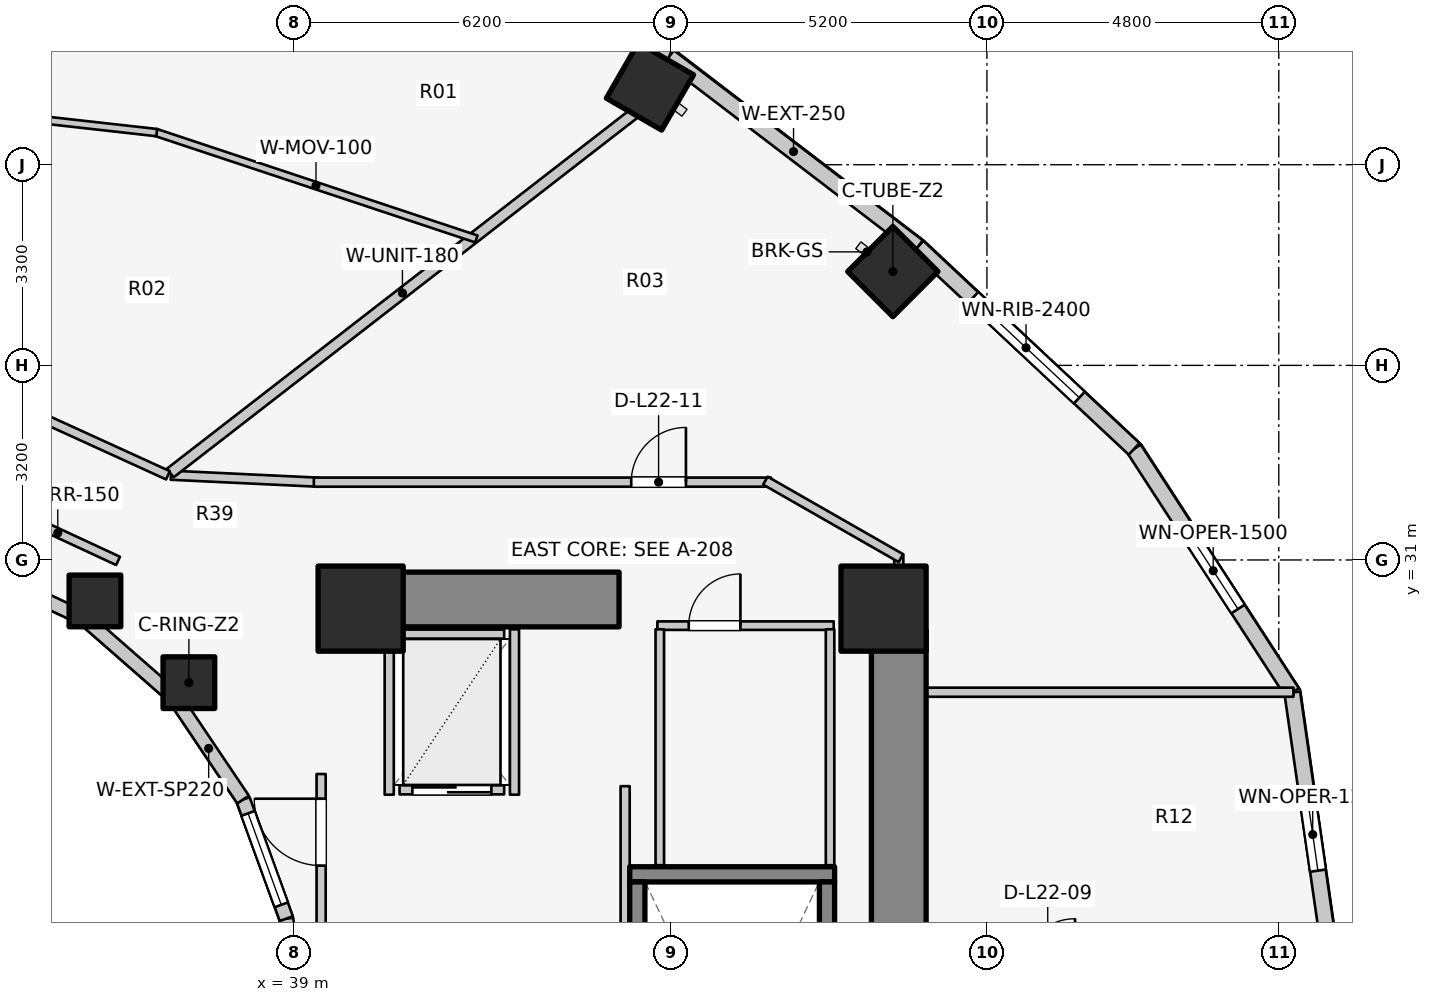
"""IFC4 building model, lengths in metres.
Left out: names, types, materials, properties, quantities, classifications, styles, units other than length and angle.
Written with IfcOpenShell. Run it as: python <this file> out.ifc"""

import sys

from ifc_helpers import new_model, si_unit, direction, frame, frame_2d, origin, origin_2d, place, context, subcontext, project, spatial, rectangle, extrude, element, fill, save


model = new_model("IFC4")
c1 = context("Model", 3, precision=1e-05, world=origin(), true_north=direction((0.0, 1.0)))
c2 = subcontext(c1, "Body", "Model", "MODEL_VIEW")
j1 = project(units=[si_unit("LENGTHUNIT", "METRE"), si_unit("PLANEANGLEUNIT", "RADIAN")], contexts=[c1])
p1 = place(None, origin())
s1 = spatial("IfcSite", under=j1, at=p1, CompositionType="ELEMENT")
p2 = place(p1, origin())
s2 = spatial("IfcBuilding", under=s1, at=p2, CompositionType="ELEMENT")
p3 = place(p2, frame((0.0, 0.0, 76.3)))
s3 = spatial("IfcBuildingStorey", under=s2, at=p3, CompositionType="ELEMENT", Elevation=76.3)
p4 = place(p3, frame((48.95, 17.05, 0.0), z_axis=(0.0, 0.0, 1.0), x_axis=(0.0, 1.0, 0.0)))
e1 = element("IfcWall", 1, at=p4, inside=s3, PredefinedType="SHEAR", context=c2, shape_type="SweptSolid", body=[
    extrude(rectangle(XDim=12.8, YDim=0.9, at=frame_2d((6.4, 0.0))), origin(), (0.0, 0.0, 1.0), 3.1),
])
p5 = place(p3, frame((39.85, 30.35, 0.0), z_axis=(0.0, 0.0, 1.0), x_axis=(1.0, 0.0, 0.0)))
e2 = element("IfcWall", 2, at=p5, inside=s3, PredefinedType="SHEAR", context=c2, shape_type="SweptSolid", body=[
    extrude(rectangle(XDim=4.5, YDim=0.9, at=frame_2d((2.25, 0.0))), origin(), (0.0, 0.0, 1.0), 3.1),
])
p6 = place(p3, frame((44.525, 25.83, 0.0), z_axis=(0.0, 0.0, 1.0), x_axis=(1.0, 0.0, 0.0)))
e3 = element("IfcWall", 3, at=p6, inside=s3, PredefinedType="SOLIDWALL", context=c2, shape_type="SweptSolid", body=[
    extrude(rectangle(XDim=3.37, YDim=0.25, at=frame_2d((1.685, 0.0))), origin(), (0.0, 0.0, 1.0), 3.1),
])
for number, where, z_axis, x_axis in (
    (4, (44.65, 17.895, 0.0), (0.0, 0.0, 1.0), (0.0, 1.0, 0.0)),
    (5, (47.77, 17.895, 0.0), (0.0, 0.0, 1.0), (0.0, 1.0, 0.0)),
):
    element("IfcWall", number, at=place(p3, frame(where, z_axis=z_axis, x_axis=x_axis)), inside=s3, PredefinedType="SOLIDWALL", context=c2, shape_type="SweptSolid", body=[
        extrude(rectangle(XDim=7.81, YDim=0.25, at=frame_2d((3.905, 0.0))), origin(), (0.0, 0.0, 1.0), 3.1),
    ])
for number, where, z_axis, x_axis in (
    (6, (48.7, 30.2, 0.0), (0.0, 0.0, 1.0), (1.0, 0.0, 0.0)),
    (7, (40.1, 30.2, 0.0), (0.0, 0.0, 1.0), (1.0, 0.0, 0.0)),
):
    element("IfcColumn", number, at=place(p3, frame(where, z_axis=z_axis, x_axis=x_axis)), inside=s3, PredefinedType="COLUMN", context=c2, shape_type="SweptSolid", body=[
        extrude(rectangle(XDim=1.4, YDim=1.4, at=origin_2d()), origin(), (0.0, 0.0, 1.0), 3.1),
    ])
p7 = place(p3, frame((37.275, 28.982, 0.0), z_axis=(0.0, 0.0, 1.0), x_axis=(1.0, 0.0, 0.0)))
e8 = element("IfcColumn", 8, at=p7, inside=s3, PredefinedType="COLUMN", context=c2, shape_type="SweptSolid", body=[
    extrude(rectangle(XDim=0.85, YDim=0.85, at=origin_2d()), origin(), (0.0, 0.0, 1.0), 3.1),
])
p8 = place(p3, frame((48.853, 35.743, 0.0), z_axis=(0.0, 0.0, 1.0), x_axis=(0.707106781187, 0.707106781187, 0.0)))
e9 = element("IfcColumn", 9, at=p8, inside=s3, PredefinedType="COLUMN", context=c2, shape_type="SweptSolid", body=[
    extrude(rectangle(XDim=1.05, YDim=1.05, at=origin_2d()), origin(), (0.0, 0.0, 1.0), 3.1),
])
p9 = place(p3, frame((35.73, 30.327, 0.0), z_axis=(0.0, 0.0, 1.0), x_axis=(1.0, 0.0, 0.0)))
e10 = element("IfcColumn", 10, at=p9, inside=s3, PredefinedType="COLUMN", context=c2, shape_type="SweptSolid", body=[
    extrude(rectangle(XDim=0.85, YDim=0.85, at=origin_2d()), origin(), (0.0, 0.0, 1.0), 3.1),
])
p10 = place(p3, frame((44.858, 38.786, 0.0), z_axis=(0.0, 0.0, 1.0), x_axis=(0.5, 0.866025403784, 0.0)))
e11 = element("IfcColumn", 11, at=p10, inside=s3, PredefinedType="COLUMN", context=c2, shape_type="SweptSolid", body=[
    extrude(rectangle(XDim=1.05, YDim=1.05, at=origin_2d()), origin(), (0.0, 0.0, 1.0), 3.1),
])
p11 = place(p3, frame((39.12, 23.0, 0.0), z_axis=(0.0, 0.0, 1.0), x_axis=(-0.114711713601, 0.993398823617, 0.0)))
e12 = element("IfcWall", 12, at=p11, inside=s3, PredefinedType="STANDARD", context=c2, shape_type="SweptSolid", body=[
    extrude(rectangle(XDim=2.115, YDim=0.23, at=frame_2d((1.058, 0.0))), origin(), (0.0, 0.0, 1.0), 2.84),
])
p12 = place(p3, frame((38.877, 25.102, 0.0), z_axis=(0.0, 0.0, 1.0), x_axis=(-0.341423187295, 0.93990968033, 0.0)))
e13 = element("IfcWall", 13, at=p12, inside=s3, PredefinedType="STANDARD", context=c2, shape_type="SweptSolid", body=[
    extrude(rectangle(XDim=2.084, YDim=0.23, at=frame_2d((1.042, 0.0))), origin(), (0.0, 0.0, 1.0), 2.84),
])
p13 = place(p12, frame((0.242, 0.0, 0.85)))
e14 = element("IfcOpeningElement", 14, at=p13, cuts=e13, PredefinedType="OPENING", context=c2, shape_type="SweptSolid", body=[
    extrude(rectangle(XDim=1.6, YDim=1.65, at=frame_2d((0.8, 0.825))), frame((0.0, 0.125, 0.0), z_axis=(0.0, -1.0, 0.0), x_axis=(1.0, 0.0, 0.0)), (0.0, 0.0, 1.0), 0.25),
])
p14 = place(p3, frame((38.166, 27.06, 0.0), z_axis=(0.0, 0.0, 1.0), x_axis=(-0.558197800898, 0.829707909492, 0.0)))
e15 = element("IfcWall", 15, at=p14, inside=s3, PredefinedType="STANDARD", context=c2, shape_type="SweptSolid", body=[
    extrude(rectangle(XDim=2.027, YDim=0.23, at=frame_2d((1.013, 0.0))), origin(), (0.0, 0.0, 1.0), 2.16),
])
p15 = place(p3, frame((37.035, 28.742, 0.0), z_axis=(0.0, 0.0, 1.0), x_axis=(-0.752576694707, 0.658504607869, 0.0)))
e16 = element("IfcWall", 16, at=p15, inside=s3, PredefinedType="STANDARD", context=c2, shape_type="SweptSolid", body=[
    extrude(rectangle(XDim=1.959, YDim=0.23, at=frame_2d((0.98, 0.0))), origin(), (0.0, 0.0, 1.0), 2.16),
])
p16 = place(p3, frame((35.56, 30.032, 0.0), z_axis=(0.0, 0.0, 1.0), x_axis=(-0.904179699603, 0.427152280606, 0.0)))
e17 = element("IfcWall", 17, at=p16, inside=s3, PredefinedType="STANDARD", context=c2, shape_type="SweptSolid", body=[
    extrude(rectangle(XDim=1.899, YDim=0.23, at=frame_2d((0.95, 0.0))), origin(), (0.0, 0.0, 1.0), 2.16),
])
p17 = place(p3, frame((56.26, 23.0, 0.0), z_axis=(0.0, 0.0, 1.0), x_axis=(-0.142572472068, 0.98978436551, 0.0)))
e18 = element("IfcWall", 18, at=p17, inside=s3, PredefinedType="STANDARD", context=c2, shape_type="SweptSolid", body=[
    extrude(rectangle(XDim=5.879, YDim=0.26, at=frame_2d((2.939, 0.0))), origin(), (0.0, 0.0, 1.0), 2.85),
])
p18 = place(p17, frame((2.921, 0.0, 0.75)))
e19 = element("IfcOpeningElement", 19, at=p18, cuts=e18, PredefinedType="OPENING", context=c2, shape_type="SweptSolid", body=[
    extrude(rectangle(XDim=1.2, YDim=1.5, at=frame_2d((0.6, 0.75))), frame((0.0, 0.14, 0.0), z_axis=(0.0, -1.0, 0.0), x_axis=(1.0, 0.0, 0.0)), (0.0, 0.0, 1.0), 0.28),
])
p19 = place(p3, frame((55.422, 28.819, 0.0), z_axis=(0.0, 0.0, 1.0), x_axis=(-0.544388392991, 0.838833283541, 0.0)))
e20 = element("IfcWall", 20, at=p19, inside=s3, PredefinedType="STANDARD", context=c2, shape_type="SweptSolid", body=[
    extrude(rectangle(XDim=4.778, YDim=0.26, at=frame_2d((2.389, 0.0))), origin(), (0.0, 0.0, 1.0), 2.85),
])
p20 = place(p19, frame((1.639, 0.0, 0.75)))
e21 = element("IfcOpeningElement", 21, at=p20, cuts=e20, PredefinedType="OPENING", context=c2, shape_type="SweptSolid", body=[
    extrude(rectangle(XDim=1.5, YDim=1.6, at=frame_2d((0.75, 0.8))), frame((0.0, 0.14, 0.0), z_axis=(0.0, -1.0, 0.0), x_axis=(1.0, 0.0, 0.0)), (0.0, 0.0, 1.0), 0.28),
])
p21 = place(p3, frame((52.821, 32.827, 0.0), z_axis=(0.0, 0.0, 1.0), x_axis=(-0.730162452258, 0.68327358599, 0.0)))
e22 = element("IfcWall", 22, at=p21, inside=s3, PredefinedType="STANDARD", context=c2, shape_type="SweptSolid", body=[
    extrude(rectangle(XDim=4.868, YDim=0.26, at=frame_2d((2.434, 0.0))), origin(), (0.0, 0.0, 1.0), 2.85),
])
p22 = place(p21, frame((1.234, 0.0, 0.75)))
e23 = element("IfcOpeningElement", 23, at=p22, cuts=e22, PredefinedType="OPENING", context=c2, shape_type="SweptSolid", body=[
    extrude(rectangle(XDim=2.4, YDim=1.7, at=frame_2d((1.2, 0.85))), frame((0.0, 0.14, 0.0), z_axis=(0.0, -1.0, 0.0), x_axis=(1.0, 0.0, 0.0)), (0.0, 0.0, 1.0), 0.28),
])
p23 = place(p3, frame((49.266, 36.153, 0.0), z_axis=(0.0, 0.0, 1.0), x_axis=(-0.794809810864, 0.606858603427, 0.0)))
e24 = element("IfcWall", 24, at=p23, inside=s3, PredefinedType="STANDARD", context=c2, shape_type="SweptSolid", body=[
    extrude(rectangle(XDim=5.149, YDim=0.26, at=frame_2d((2.575, 0.0))), origin(), (0.0, 0.0, 1.0), 2.85),
])
p24 = place(p3, frame((45.173, 39.278, 0.0), z_axis=(0.0, 0.0, 1.0), x_axis=(-0.914336605747, 0.404955023911, 0.0)))
e25 = element("IfcWall", 25, at=p24, inside=s3, PredefinedType="STANDARD", context=c2, shape_type="SweptSolid", body=[
    extrude(rectangle(XDim=5.859, YDim=0.26, at=frame_2d((2.929, 0.0))), origin(), (0.0, 0.0, 1.0), 2.85),
])
p25 = place(p24, frame((2.179, 0.0, 0.75)))
e26 = element("IfcOpeningElement", 26, at=p25, cuts=e25, PredefinedType="OPENING", context=c2, shape_type="SweptSolid", body=[
    extrude(rectangle(XDim=1.5, YDim=1.6, at=frame_2d((0.75, 0.8))), frame((0.0, 0.14, 0.0), z_axis=(0.0, -1.0, 0.0), x_axis=(1.0, 0.0, 0.0)), (0.0, 0.0, 1.0), 0.28),
])
p26 = place(p3, frame((40.74, 27.22, 0.0), z_axis=(0.0, 0.0, 1.0), x_axis=(1.0, 0.0, 0.0)))
e27 = element("IfcWall", 27, at=p26, inside=s3, PredefinedType="SOLIDWALL", context=c2, shape_type="SweptSolid", body=[
    extrude(rectangle(XDim=1.72, YDim=0.15, at=frame_2d((0.86, 0.0))), origin(), (0.0, 0.0, 1.0), 2.855),
])
p27 = place(p26, frame((0.21, 0.0, 0.0)))
e28 = element("IfcOpeningElement", 28, at=p27, cuts=e27, PredefinedType="OPENING", context=c2, shape_type="SweptSolid", body=[
    extrude(rectangle(XDim=1.3, YDim=2.1, at=frame_2d((0.65, 1.05))), frame((0.0, 0.085, 0.0), z_axis=(0.0, -1.0, 0.0), x_axis=(1.0, 0.0, 0.0)), (0.0, 0.0, 1.0), 0.17),
])
p28 = place(p3, frame((40.74, 29.78, 0.0), z_axis=(0.0, 0.0, 1.0), x_axis=(1.0, 0.0, 0.0)))
e29 = element("IfcWall", 29, at=p28, inside=s3, PredefinedType="SOLIDWALL", context=c2, shape_type="SweptSolid", body=[
    extrude(rectangle(XDim=1.72, YDim=0.15, at=frame_2d((0.86, 0.0))), origin(), (0.0, 0.0, 1.0), 2.855),
])
for number, where, z_axis, x_axis in (
    (30, (40.57, 27.14, 0.0), (0.0, 0.0, 1.0), (0.0, 1.0, 0.0)),
    (31, (42.63, 27.14, 0.0), (0.0, 0.0, 1.0), (0.0, 1.0, 0.0)),
):
    element("IfcWall", number, at=place(p3, frame(where, z_axis=z_axis, x_axis=x_axis)), inside=s3, PredefinedType="SOLIDWALL", context=c2, shape_type="SweptSolid", body=[
        extrude(rectangle(XDim=2.72, YDim=0.15, at=frame_2d((1.36, 0.0))), origin(), (0.0, 0.0, 1.0), 2.855),
    ])
p29 = place(p3, frame((44.45, 24.08, 0.0), z_axis=(0.0, 0.0, 1.0), x_axis=(0.0, 1.0, 0.0)))
e32 = element("IfcWall", 32, at=p29, inside=s3, PredefinedType="PARTITIONING", context=c2, shape_type="SweptSolid", body=[
    extrude(rectangle(XDim=3.2, YDim=0.15, at=frame_2d((1.6, 0.0))), origin(), (0.0, 0.0, 1.0), 2.855),
])
p30 = place(p3, frame((39.45, 24.08, 0.0), z_axis=(0.0, 0.0, 1.0), x_axis=(0.0, 1.0, 0.0)))
e33 = element("IfcWall", 33, at=p30, inside=s3, PredefinedType="PARTITIONING", context=c2, shape_type="SweptSolid", body=[
    extrude(rectangle(XDim=3.4, YDim=0.15, at=frame_2d((1.7, 0.0))), origin(), (0.0, 0.0, 1.0), 2.855),
])
p31 = place(p30, frame((1.894, 0.0, 0.0)))
e34 = element("IfcOpeningElement", 34, at=p31, cuts=e33, PredefinedType="OPENING", context=c2, shape_type="SweptSolid", body=[
    extrude(rectangle(XDim=1.1, YDim=2.1, at=frame_2d((0.55, 1.05))), frame((0.0, 0.085, 0.0), z_axis=(0.0, -1.0, 0.0), x_axis=(1.0, 0.0, 0.0)), (0.0, 0.0, 1.0), 0.17),
])
p32 = place(p3, frame((44.98, 29.92, 0.0), z_axis=(0.0, 0.0, 1.0), x_axis=(1.0, 0.0, 0.0)))
e35 = element("IfcWall", 35, at=p32, inside=s3, PredefinedType="PLUMBINGWALL", context=c2, shape_type="SweptSolid", body=[
    extrude(rectangle(XDim=2.9, YDim=0.14, at=frame_2d((1.45, 0.0))), origin(), (0.0, 0.0, 1.0), 2.855),
])
p33 = place(p32, frame((0.516, 0.0, 0.0)))
e36 = element("IfcOpeningElement", 36, at=p33, cuts=e35, PredefinedType="OPENING", context=c2, shape_type="SweptSolid", body=[
    extrude(rectangle(XDim=0.85, YDim=2.05, at=frame_2d((0.425, 1.025))), frame((0.0, 0.08, 0.0), z_axis=(0.0, -1.0, 0.0), x_axis=(1.0, 0.0, 0.0)), (0.0, 0.0, 1.0), 0.16),
])
for number, where, z_axis, x_axis in (
    (37, (45.02, 25.98, 0.0), (0.0, 0.0, 1.0), (0.0, 1.0, 0.0)),
    (38, (47.82, 25.98, 0.0), (0.0, 0.0, 1.0), (0.0, 1.0, 0.0)),
):
    element("IfcWall", number, at=place(p3, frame(where, z_axis=z_axis, x_axis=x_axis)), inside=s3, PredefinedType="PLUMBINGWALL", context=c2, shape_type="SweptSolid", body=[
        extrude(rectangle(XDim=3.88, YDim=0.14, at=frame_2d((1.94, 0.0))), origin(), (0.0, 0.0, 1.0), 2.855),
    ])
p34 = place(p3, frame((36.11, 30.985, 0.0), z_axis=(0.0, 0.0, 1.0), x_axis=(-0.906943449489, 0.421252393975, 0.0)))
e39 = element("IfcWall", 39, at=p34, inside=s3, PredefinedType="PARTITIONING", context=c2, shape_type="SweptSolid", body=[
    extrude(rectangle(XDim=2.186, YDim=0.15, at=frame_2d((1.093, 0.0))), origin(), (0.0, 0.0, 1.0), 2.272),
])
p35 = place(p3, frame((48.95, 28.825, 0.0), z_axis=(0.0, 0.0, 1.0), x_axis=(1.0, 0.0, 0.0)))
e40 = element("IfcWall", 40, at=p35, inside=s3, PredefinedType="PARTITIONING", context=c2, shape_type="SweptSolid", body=[
    extrude(rectangle(XDim=6.492, YDim=0.15, at=frame_2d((3.246, 0.0))), origin(), (0.0, 0.0, 1.0), 2.855),
])
p36 = place(p3, frame((48.95, 29.8, 0.0), z_axis=(0.0, 0.0, 1.0), x_axis=(0.0, 1.0, 0.0)))
e41 = element("IfcWall", 41, at=p36, inside=s3, PredefinedType="PARTITIONING", context=c2, shape_type="SweptSolid", body=[
    extrude(rectangle(XDim=1.29, YDim=0.15, at=frame_2d((0.645, 0.0))), origin(), (0.0, 0.0, 1.0), 2.142),
])
p37 = place(p3, frame((36.98, 32.394, 0.0), z_axis=(0.0, 0.0, 1.0), x_axis=(0.998877427952, -0.047369651964, 0.0)))
e42 = element("IfcWall", 42, at=p37, inside=s3, PredefinedType="PARTITIONING", context=c2, shape_type="SweptSolid", body=[
    extrude(rectangle(XDim=2.433, YDim=0.15, at=frame_2d((1.216, 0.0))), origin(), (0.0, 0.0, 1.0), 2.272),
])
p38 = place(p3, frame((39.33, 32.28, 0.0), z_axis=(0.0, 0.0, 1.0), x_axis=(1.0, 0.0, 0.0)))
e43 = element("IfcWall", 43, at=p38, inside=s3, PredefinedType="PARTITIONING", context=c2, shape_type="SweptSolid", body=[
    extrude(rectangle(XDim=7.52, YDim=0.15, at=frame_2d((3.76, 0.0))), origin(), (0.0, 0.0, 1.0), 2.272),
])
p39 = place(p38, frame((5.22, 0.0, 0.0)))
e44 = element("IfcOpeningElement", 44, at=p39, cuts=e43, PredefinedType="OPENING", context=c2, shape_type="SweptSolid", body=[
    extrude(rectangle(XDim=0.9, YDim=2.1, at=frame_2d((0.45, 1.05))), frame((0.0, 0.085, 0.0), z_axis=(0.0, -1.0, 0.0), x_axis=(1.0, 0.0, 0.0)), (0.0, 0.0, 1.0), 0.17),
])
p40 = place(p3, frame((46.757, 32.305, 0.0), z_axis=(0.0, 0.0, 1.0), x_axis=(0.867991349648, -0.496579315857, 0.0)))
e45 = element("IfcWall", 45, at=p40, inside=s3, PredefinedType="PARTITIONING", context=c2, shape_type="SweptSolid", body=[
    extrude(rectangle(XDim=2.567, YDim=0.15, at=frame_2d((1.283, 0.0))), origin(), (0.0, 0.0, 1.0), 2.142),
])
p41 = place(p3, frame((36.969, 32.43, 0.0), z_axis=(0.0, 0.0, 1.0), x_axis=(0.790421780952, 0.612562983045, 0.0)))
e46 = element("IfcWall", 46, at=p41, inside=s3, PredefinedType="PARTITIONING", context=c2, shape_type="SweptSolid", body=[
    extrude(rectangle(XDim=9.662, YDim=0.18, at=frame_2d((4.831, 0.0))), origin(), (0.0, 0.0, 1.0), 2.272),
])
p42 = place(p3, frame((42.003, 36.279, 0.0), z_axis=(0.0, 0.0, 1.0), x_axis=(-0.948981517829, 0.315331696502, 0.0)))
e47 = element("IfcWall", 47, at=p42, inside=s3, PredefinedType="MOVABLE", context=c2, shape_type="SweptSolid", body=[
    extrude(rectangle(XDim=5.559, YDim=0.12, at=frame_2d((2.78, 0.0))), origin(), (0.0, 0.0, 1.0), 2.272),
])
p43 = place(p3, frame((36.747, 38.028, 0.0), z_axis=(0.0, 0.0, 1.0), x_axis=(-0.9937938415, 0.111237586262, 0.0)))
e48 = element("IfcWall", 48, at=p43, inside=s3, PredefinedType="MOVABLE", context=c2, shape_type="SweptSolid", body=[
    extrude(rectangle(XDim=4.787, YDim=0.12, at=frame_2d((2.394, 0.0))), origin(), (0.0, 0.0, 1.0), 2.272),
])
p44 = place(p3, frame((36.931, 32.393, 0.0), z_axis=(0.0, 0.0, 1.0), x_axis=(-0.909747571199, 0.415161843982, 0.0)))
e49 = element("IfcWall", 49, at=p44, inside=s3, PredefinedType="PARTITIONING", context=c2, shape_type="SweptSolid", body=[
    extrude(rectangle(XDim=2.625, YDim=0.15, at=frame_2d((1.312, 0.0))), origin(), (0.0, 0.0, 1.0), 2.272),
])
p45 = place(p13, origin())
e50 = element("IfcWindow", 50, at=p45, inside=s3, PartitioningType="SINGLE_PANEL", PredefinedType="WINDOW", context=c2, shape_type="SweptSolid", body=[
    extrude(rectangle(XDim=1.6, YDim=1.65, at=frame_2d((0.8, 0.825))), frame((0.0, 0.03, 0.0), z_axis=(0.0, -1.0, 0.0), x_axis=(1.0, 0.0, 0.0)), (0.0, 0.0, 1.0), 0.06),
])
fill(e14, e50)
p46 = place(p18, origin())
e51 = element("IfcWindow", 51, at=p46, inside=s3, PartitioningType="SINGLE_PANEL", PredefinedType="WINDOW", context=c2, shape_type="SweptSolid", body=[
    extrude(rectangle(XDim=1.2, YDim=1.5, at=frame_2d((0.6, 0.75))), frame((0.0, 0.03, 0.0), z_axis=(0.0, -1.0, 0.0), x_axis=(1.0, 0.0, 0.0)), (0.0, 0.0, 1.0), 0.06),
])
fill(e19, e51)
p47 = place(p20, origin())
e52 = element("IfcWindow", 52, at=p47, inside=s3, PartitioningType="SINGLE_PANEL", PredefinedType="WINDOW", context=c2, shape_type="SweptSolid", body=[
    extrude(rectangle(XDim=1.5, YDim=1.6, at=frame_2d((0.75, 0.8))), frame((0.0, 0.03, 0.0), z_axis=(0.0, -1.0, 0.0), x_axis=(1.0, 0.0, 0.0)), (0.0, 0.0, 1.0), 0.06),
])
fill(e21, e52)
p48 = place(p22, origin())
e53 = element("IfcWindow", 53, at=p48, inside=s3, PartitioningType="SINGLE_PANEL", PredefinedType="WINDOW", context=c2, shape_type="SweptSolid", body=[
    extrude(rectangle(XDim=2.4, YDim=1.7, at=frame_2d((1.2, 0.85))), frame((0.0, 0.03, 0.0), z_axis=(0.0, -1.0, 0.0), x_axis=(1.0, 0.0, 0.0)), (0.0, 0.0, 1.0), 0.06),
])
fill(e23, e53)
p49 = place(p27, origin())
e54 = element("IfcDoor", 54, at=p49, inside=s3, OperationType="DOUBLE_DOOR_SLIDING", PredefinedType="DOOR", context=c2, shape_type="SweptSolid", body=[
    extrude(rectangle(XDim=1.3, YDim=2.1, at=frame_2d((0.65, 1.05))), frame((0.0, 0.025, 0.0), z_axis=(0.0, -1.0, 0.0), x_axis=(1.0, 0.0, 0.0)), (0.0, 0.0, 1.0), 0.05),
])
fill(e28, e54)
p50 = place(p31, origin())
e55 = element("IfcDoor", 55, at=p50, inside=s3, OperationType="SINGLE_SWING_RIGHT", PredefinedType="DOOR", context=c2, shape_type="SweptSolid", body=[
    extrude(rectangle(XDim=1.1, YDim=2.1, at=frame_2d((0.55, 1.05))), frame((0.0, 0.025, 0.0), z_axis=(0.0, -1.0, 0.0), x_axis=(1.0, 0.0, 0.0)), (0.0, 0.0, 1.0), 0.05),
])
fill(e34, e55)
p51 = place(p33, origin())
e56 = element("IfcDoor", 56, at=p51, inside=s3, OperationType="SINGLE_SWING_RIGHT", PredefinedType="DOOR", context=c2, shape_type="SweptSolid", body=[
    extrude(rectangle(XDim=0.85, YDim=2.05, at=frame_2d((0.425, 1.025))), frame((0.0, 0.025, 0.0), z_axis=(0.0, -1.0, 0.0), x_axis=(1.0, 0.0, 0.0)), (0.0, 0.0, 1.0), 0.05),
])
fill(e36, e56)
p52 = place(p39, origin())
e57 = element("IfcDoor", 57, at=p52, inside=s3, OperationType="SINGLE_SWING_RIGHT", PredefinedType="DOOR", context=c2, shape_type="SweptSolid", body=[
    extrude(rectangle(XDim=0.9, YDim=2.1, at=frame_2d((0.45, 1.05))), frame((0.0, 0.025, 0.0), z_axis=(0.0, -1.0, 0.0), x_axis=(1.0, 0.0, 0.0)), (0.0, 0.0, 1.0), 0.05),
])
fill(e44, e57)
save(model, sys.argv[1])
